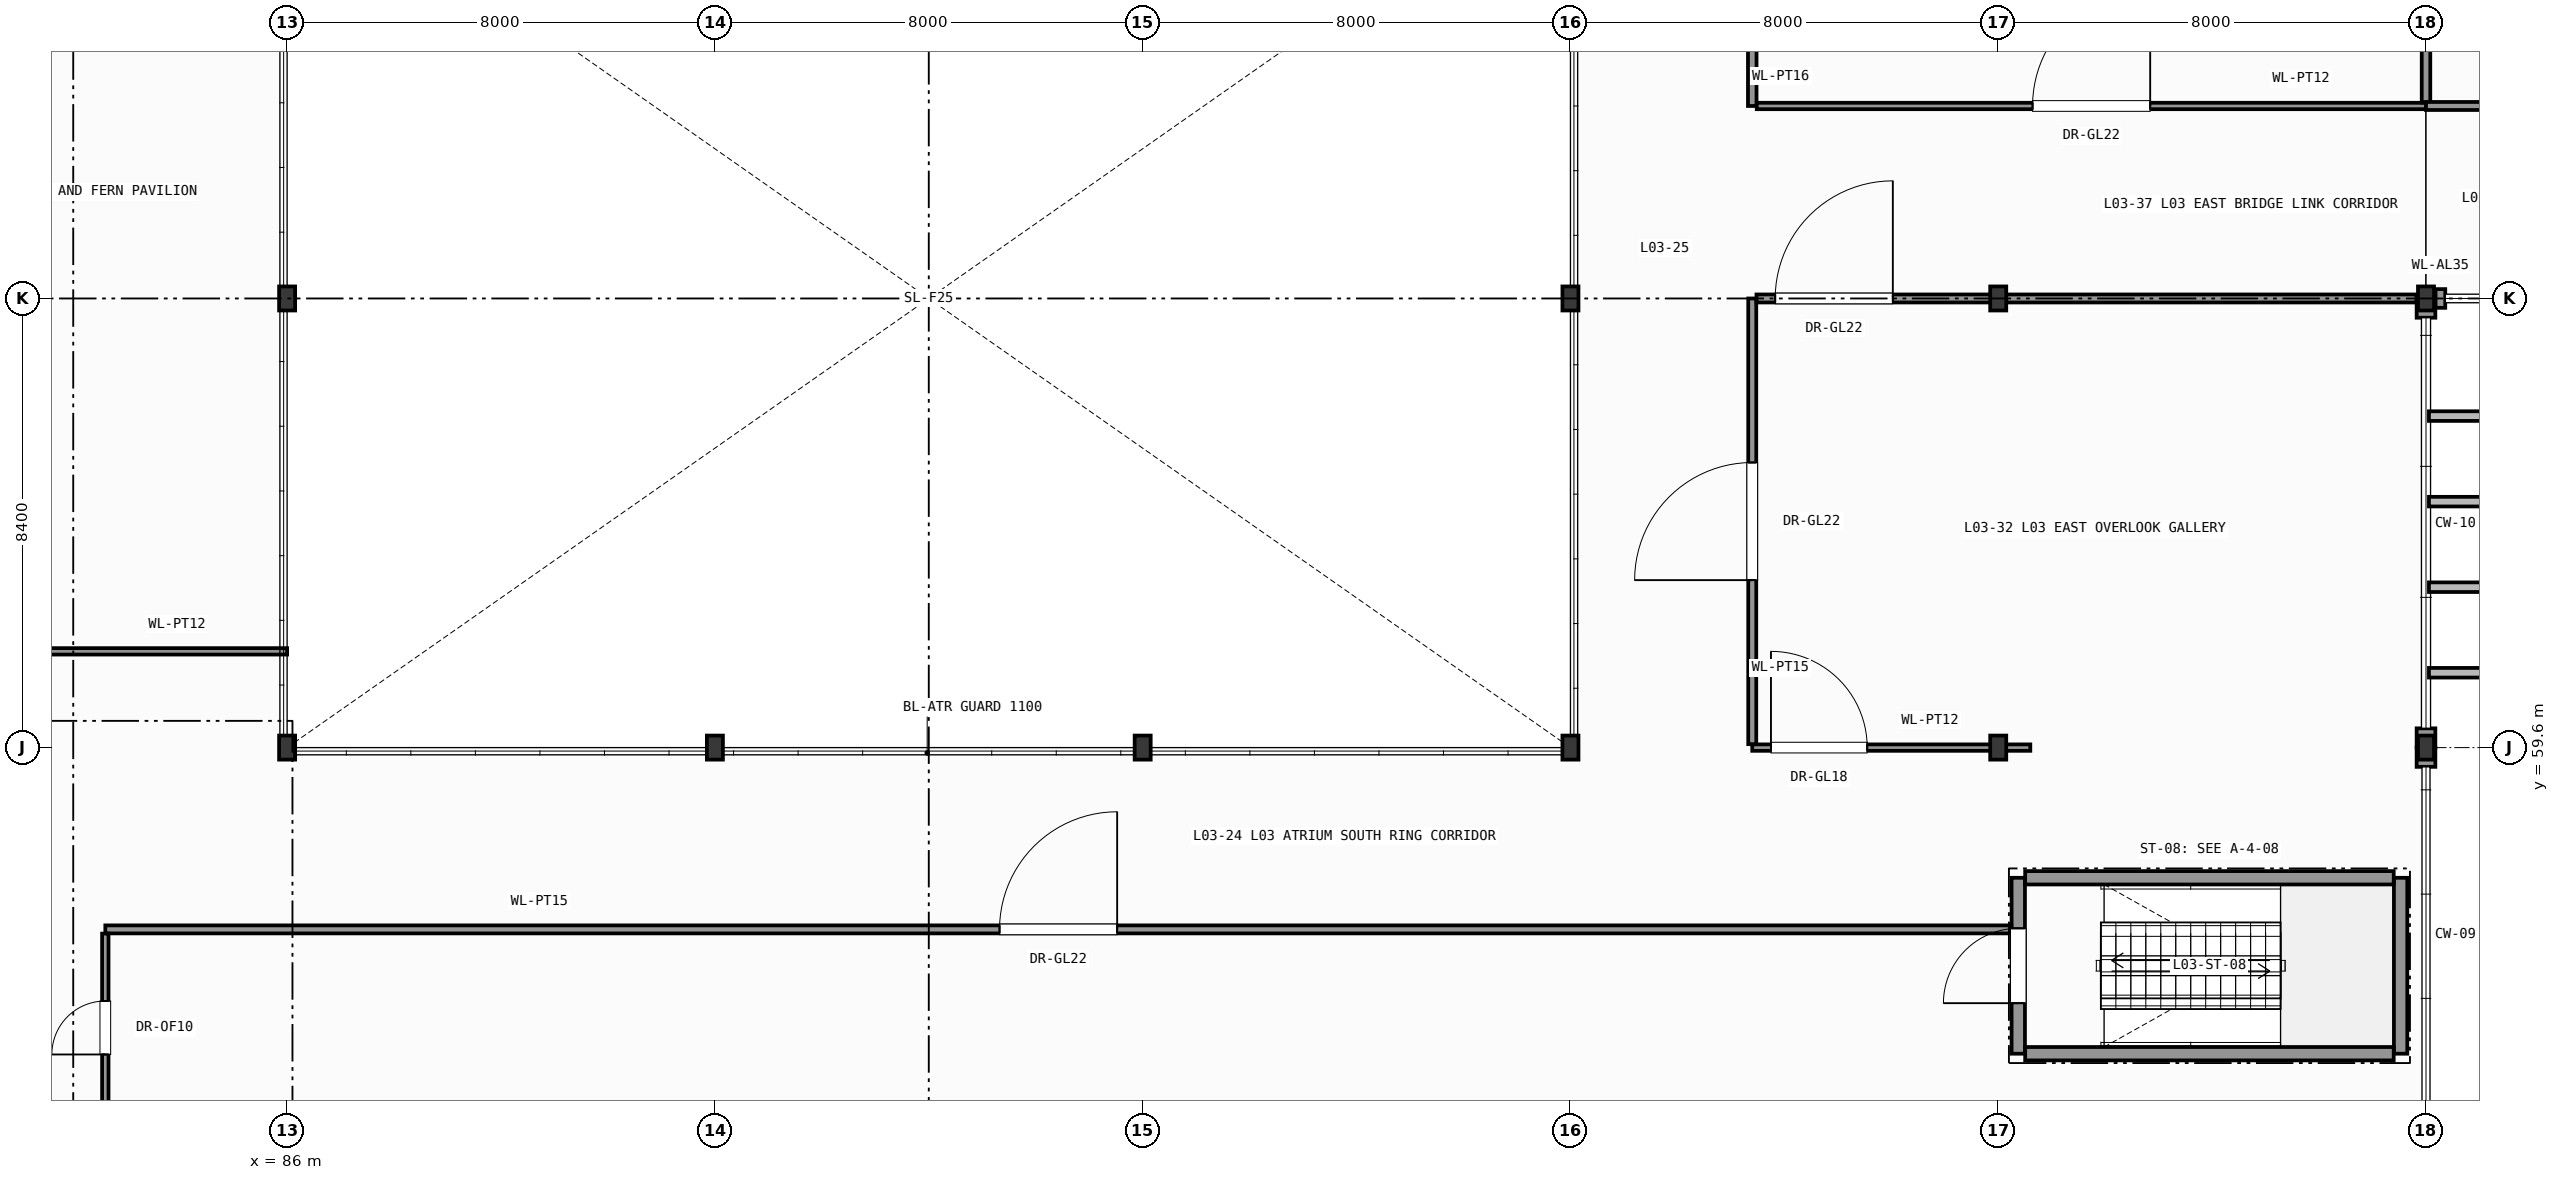
"""IFC4 building model, lengths in metres.
Left out: names, types, materials, properties, quantities, classifications, styles, units other than length and angle.
Written with IfcOpenShell. Run it as: python <this file> out.ifc"""

import sys

from ifc_helpers import new_model, si_unit, direction, frame, frame_2d, origin, origin_2d, place, context, subcontext, project, spatial, rectangle, i_section, extrude, element, fill, save


model = new_model("IFC4")
c1 = context("Model", 3, precision=1e-05, world=origin(), true_north=direction((0.0, 1.0)))
c2 = subcontext(c1, "Body", "Model", "MODEL_VIEW")
j1 = project(units=[si_unit("LENGTHUNIT", "METRE"), si_unit("PLANEANGLEUNIT", "RADIAN")], contexts=[c1])
p1 = place(None, origin())
s1 = spatial("IfcSite", under=j1, at=p1, CompositionType="ELEMENT")
p2 = place(p1, origin())
s2 = spatial("IfcBuilding", under=s1, at=p2, CompositionType="ELEMENT")
p3 = place(p2, frame((0.0, 0.0, 13.2)))
s3 = spatial("IfcBuildingStorey", under=s2, at=p3, CompositionType="ELEMENT", Elevation=13.2)
for number, where, z_axis, x_axis in (
    (1, (86.0, 59.6, 0.0), (0.0, 0.0, 1.0), (1.0, 0.0, 0.0)),
    (2, (86.0, 68.0, 0.0), (0.0, 0.0, 1.0), (1.0, 0.0, 0.0)),
    (3, (94.0, 59.6, 0.0), (0.0, 0.0, 1.0), (1.0, 0.0, 0.0)),
    (4, (102.0, 59.6, 0.0), (0.0, 0.0, 1.0), (1.0, 0.0, 0.0)),
    (5, (110.0, 59.6, 0.0), (0.0, 0.0, 1.0), (1.0, 0.0, 0.0)),
    (6, (110.0, 68.0, 0.0), (0.0, 0.0, 1.0), (1.0, 0.0, 0.0)),
    (7, (118.0, 59.6, 0.0), (0.0, 0.0, 1.0), (1.0, 0.0, 0.0)),
    (8, (118.0, 68.0, 0.0), (0.0, 0.0, 1.0), (1.0, 0.0, 0.0)),
    (9, (126.0, 59.6, 0.0), (0.0, 0.0, 1.0), (1.0, 0.0, 0.0)),
    (10, (126.0, 68.0, 0.0), (0.0, 0.0, 1.0), (1.0, 0.0, 0.0)),
):
    element("IfcColumn", number, at=place(p3, frame(where, z_axis=z_axis, x_axis=x_axis)), inside=s3, PredefinedType="COLUMN", context=c2, shape_type="SweptSolid", body=[
        extrude(i_section(OverallWidth=0.3, OverallDepth=0.45, WebThickness=0.014, FlangeThickness=0.026, FilletRadius=0.027, at=origin_2d()), origin(), (0.0, 0.0, 1.0), 4.8),
    ])
p4 = place(p3, frame((126.0, 59.24, 0.0), z_axis=(0.0, 0.0, 1.0), x_axis=(0.0, 1.0, 0.0)))
e11 = element("IfcWall", 11, at=p4, inside=s3, PredefinedType="SOLIDWALL", context=c2, shape_type="SweptSolid", body=[
    extrude(rectangle(XDim=0.36, YDim=0.35, at=frame_2d((0.18, 0.0))), origin(), (0.0, 0.0, 1.0), 4.255),
])
p5 = place(p3, frame((126.0, 59.6, 0.0), z_axis=(0.0, 0.0, 1.0), x_axis=(0.0, 1.0, 0.0)))
e12 = element("IfcWall", 12, at=p5, inside=s3, PredefinedType="SOLIDWALL", context=c2, shape_type="SweptSolid", body=[
    extrude(rectangle(XDim=0.36, YDim=0.35, at=frame_2d((0.18, 0.0))), origin(), (0.0, 0.0, 1.0), 4.105),
])
p6 = place(p3, frame((126.0, 67.64, 0.0), z_axis=(0.0, 0.0, 1.0), x_axis=(0.0, 1.0, 0.0)))
e13 = element("IfcWall", 13, at=p6, inside=s3, PredefinedType="SOLIDWALL", context=c2, shape_type="SweptSolid", body=[
    extrude(rectangle(XDim=0.36, YDim=0.35, at=frame_2d((0.18, 0.0))), origin(), (0.0, 0.0, 1.0), 4.105),
])
p7 = place(p3, frame((126.179, 68.0, 0.0), z_axis=(0.0, 0.0, 1.0), x_axis=(1.0, 0.0, 0.0)))
e14 = element("IfcWall", 14, at=p7, inside=s3, PredefinedType="SOLIDWALL", context=c2, shape_type="SweptSolid", body=[
    extrude(rectangle(XDim=0.181, YDim=0.35, at=frame_2d((0.091, 0.0))), origin(), (0.0, 0.0, 1.0), 4.56),
])
p8 = place(p3, frame((118.375, 53.875, 0.0), z_axis=(0.0, 0.0, 1.0), x_axis=(0.0, 1.0, 0.0)))
e15 = element("IfcWall", 15, at=p8, inside=s3, PredefinedType="SHEAR", context=c2, shape_type="SweptSolid", body=[
    extrude(rectangle(XDim=3.29, YDim=0.25, at=frame_2d((1.645, 0.0))), origin(), (0.0, 0.0, 1.0), 4.56),
])
p9 = place(p8, frame((0.945, 0.0, 0.0)))
e16 = element("IfcOpeningElement", 16, at=p9, cuts=e15, PredefinedType="OPENING", context=c2, shape_type="SweptSolid", body=[
    extrude(rectangle(XDim=1.4, YDim=2.2, at=frame_2d((0.7, 1.1))), frame((0.0, 0.135, 0.0), z_axis=(0.0, -1.0, 0.0), x_axis=(1.0, 0.0, 0.0)), (0.0, 0.0, 1.0), 0.27),
])
p10 = place(p3, frame((125.525, 53.875, 0.0), z_axis=(0.0, 0.0, 1.0), x_axis=(0.0, 1.0, 0.0)))
e17 = element("IfcWall", 17, at=p10, inside=s3, PredefinedType="SHEAR", context=c2, shape_type="SweptSolid", body=[
    extrude(rectangle(XDim=3.29, YDim=0.25, at=frame_2d((1.645, 0.0))), origin(), (0.0, 0.0, 1.0), 4.56),
])
for number, where, z_axis, x_axis in (
    (18, (118.504, 53.875, 0.0), (0.0, 0.0, 1.0), (1.0, 0.0, 0.0)),
    (19, (118.504, 57.165, 0.0), (0.0, 0.0, 1.0), (1.0, 0.0, 0.0)),
):
    element("IfcWall", number, at=place(p3, frame(where, z_axis=z_axis, x_axis=x_axis)), inside=s3, PredefinedType="SHEAR", context=c2, shape_type="SweptSolid", body=[
        extrude(rectangle(XDim=6.892, YDim=0.25, at=frame_2d((3.446, 0.0))), origin(), (0.0, 0.0, 1.0), 4.56),
    ])
p11 = place(p3, frame((74.6, 61.4, 0.0), z_axis=(0.0, 0.0, 1.0), x_axis=(1.0, 0.0, 0.0)))
e20 = element("IfcWall", 20, at=p11, inside=s3, PredefinedType="PARTITIONING", context=c2, shape_type="SweptSolid", body=[
    extrude(rectangle(XDim=11.4, YDim=0.12, at=frame_2d((5.7, 0.0))), origin(), (0.0, 0.0, 1.0), 4.56),
])
p12 = place(p11, frame((4.6, 0.0, 0.0)))
e21 = element("IfcOpeningElement", 21, at=p12, cuts=e20, PredefinedType="OPENING", context=c2, shape_type="SweptSolid", body=[
    extrude(rectangle(XDim=2.2, YDim=2.6, at=frame_2d((1.1, 1.3))), frame((0.0, 0.07, 0.0), z_axis=(0.0, -1.0, 0.0), x_axis=(1.0, 0.0, 0.0)), (0.0, 0.0, 1.0), 0.14),
])
p13 = place(p3, frame((82.6, 56.2, 0.0), z_axis=(0.0, 0.0, 1.0), x_axis=(1.0, 0.0, 0.0)))
e22 = element("IfcWall", 22, at=p13, inside=s3, PredefinedType="PARTITIONING", context=c2, shape_type="SweptSolid", body=[
    extrude(rectangle(XDim=35.646, YDim=0.15, at=frame_2d((17.823, 0.0))), origin(), (0.0, 0.0, 1.0), 4.185),
])
p14 = place(p13, frame((16.723, 0.0, 0.0)))
e23 = element("IfcOpeningElement", 23, at=p14, cuts=e22, PredefinedType="OPENING", context=c2, shape_type="SweptSolid", body=[
    extrude(rectangle(XDim=2.2, YDim=2.6, at=frame_2d((1.1, 1.3))), frame((0.0, 0.085, 0.0), z_axis=(0.0, -1.0, 0.0), x_axis=(1.0, 0.0, 0.0)), (0.0, 0.0, 1.0), 0.17),
])
p15 = place(p3, frame((113.4, 59.6, 0.0), z_axis=(0.0, 0.0, 1.0), x_axis=(1.0, 0.0, 0.0)))
e24 = element("IfcWall", 24, at=p15, inside=s3, PredefinedType="PARTITIONING", context=c2, shape_type="SweptSolid", body=[
    extrude(rectangle(XDim=5.2, YDim=0.12, at=frame_2d((2.6, 0.0))), origin(), (0.0, 0.0, 1.0), 4.155),
])
p16 = place(p15, frame((0.35, 0.0, 0.0)))
e25 = element("IfcOpeningElement", 25, at=p16, cuts=e24, PredefinedType="OPENING", context=c2, shape_type="SweptSolid", body=[
    extrude(rectangle(XDim=1.8, YDim=2.4, at=frame_2d((0.9, 1.2))), frame((0.0, 0.07, 0.0), z_axis=(0.0, -1.0, 0.0), x_axis=(1.0, 0.0, 0.0)), (0.0, 0.0, 1.0), 0.14),
])
p17 = place(p3, frame((113.4, 71.6, 0.0), z_axis=(0.0, 0.0, 1.0), x_axis=(0.0, 1.0, 0.0)))
e26 = element("IfcWall", 26, at=p17, inside=s3, PredefinedType="PARTITIONING", context=c2, shape_type="SweptSolid", body=[
    extrude(rectangle(XDim=4.8, YDim=0.16, at=frame_2d((2.4, 0.0))), origin(), (0.0, 0.0, 1.0), 4.56),
])
p18 = place(p17, frame((1.5, 0.0, 0.0)))
e27 = element("IfcOpeningElement", 27, at=p18, cuts=e26, PredefinedType="OPENING", context=c2, shape_type="SweptSolid", body=[
    extrude(rectangle(XDim=1.8, YDim=2.4, at=frame_2d((0.9, 1.2))), frame((0.0, 0.09, 0.0), z_axis=(0.0, -1.0, 0.0), x_axis=(1.0, 0.0, 0.0)), (0.0, 0.0, 1.0), 0.18),
])
p19 = place(p3, frame((113.4, 59.664, 0.0), z_axis=(0.0, 0.0, 1.0), x_axis=(0.0, 1.0, 0.0)))
e28 = element("IfcWall", 28, at=p19, inside=s3, PredefinedType="PARTITIONING", context=c2, shape_type="SweptSolid", body=[
    extrude(rectangle(XDim=8.336, YDim=0.15, at=frame_2d((4.168, 0.0))), origin(), (0.0, 0.0, 1.0), 4.56),
])
p20 = place(p19, frame((3.068, 0.0, 0.0)))
e29 = element("IfcOpeningElement", 29, at=p20, cuts=e28, PredefinedType="OPENING", context=c2, shape_type="SweptSolid", body=[
    extrude(rectangle(XDim=2.2, YDim=2.6, at=frame_2d((1.1, 1.3))), frame((0.0, 0.085, 0.0), z_axis=(0.0, -1.0, 0.0), x_axis=(1.0, 0.0, 0.0)), (0.0, 0.0, 1.0), 0.17),
])
p21 = place(p3, frame((82.6, 52.6, 0.0), z_axis=(0.0, 0.0, 1.0), x_axis=(0.0, 1.0, 0.0)))
e30 = element("IfcWall", 30, at=p21, inside=s3, PredefinedType="PARTITIONING", context=c2, shape_type="SweptSolid", body=[
    extrude(rectangle(XDim=3.521, YDim=0.12, at=frame_2d((1.76, 0.0))), origin(), (0.0, 0.0, 1.0), 4.56),
])
p22 = place(p21, frame((1.26, 0.0, 0.0)))
e31 = element("IfcOpeningElement", 31, at=p22, cuts=e30, PredefinedType="OPENING", context=c2, shape_type="SweptSolid", body=[
    extrude(rectangle(XDim=1.0, YDim=2.15, at=frame_2d((0.5, 1.075))), frame((0.0, 0.07, 0.0), z_axis=(0.0, -1.0, 0.0), x_axis=(1.0, 0.0, 0.0)), (0.0, 0.0, 1.0), 0.14),
])
p23 = place(p3, frame((113.484, 71.6, 0.0), z_axis=(0.0, 0.0, 1.0), x_axis=(1.0, 0.0, 0.0)))
e32 = element("IfcWall", 32, at=p23, inside=s3, PredefinedType="PARTITIONING", context=c2, shape_type="SweptSolid", body=[
    extrude(rectangle(XDim=12.516, YDim=0.12, at=frame_2d((6.258, 0.0))), origin(), (0.0, 0.0, 1.0), 4.56),
])
p24 = place(p23, frame((5.158, 0.0, 0.0)))
e33 = element("IfcOpeningElement", 33, at=p24, cuts=e32, PredefinedType="OPENING", context=c2, shape_type="SweptSolid", body=[
    extrude(rectangle(XDim=2.2, YDim=2.6, at=frame_2d((1.1, 1.3))), frame((0.0, 0.07, 0.0), z_axis=(0.0, -1.0, 0.0), x_axis=(1.0, 0.0, 0.0)), (0.0, 0.0, 1.0), 0.14),
])
p25 = place(p3, frame((126.0, 71.664, 0.0), z_axis=(0.0, 0.0, 1.0), x_axis=(0.0, 1.0, 0.0)))
e34 = element("IfcWall", 34, at=p25, inside=s3, PredefinedType="PARTITIONING", context=c2, shape_type="SweptSolid", body=[
    extrude(rectangle(XDim=4.557, YDim=0.16, at=frame_2d((2.278, 0.0))), origin(), (0.0, 0.0, 1.0), 4.105),
])
p26 = place(p25, frame((1.378, 0.0, 0.0)))
e35 = element("IfcOpeningElement", 35, at=p26, cuts=e34, PredefinedType="OPENING", context=c2, shape_type="SweptSolid", body=[
    extrude(rectangle(XDim=1.8, YDim=2.4, at=frame_2d((0.9, 1.2))), frame((0.0, 0.09, 0.0), z_axis=(0.0, -1.0, 0.0), x_axis=(1.0, 0.0, 0.0)), (0.0, 0.0, 1.0), 0.18),
])
p27 = place(p3, frame((113.479, 68.0, 0.0), z_axis=(0.0, 0.0, 1.0), x_axis=(1.0, 0.0, 0.0)))
e36 = element("IfcWall", 36, at=p27, inside=s3, PredefinedType="PARTITIONING", context=c2, shape_type="SweptSolid", body=[
    extrude(rectangle(XDim=12.342, YDim=0.15, at=frame_2d((6.171, 0.0))), origin(), (0.0, 0.0, 1.0), 4.095),
])
p28 = place(p27, frame((0.35, 0.0, 0.0)))
e37 = element("IfcOpeningElement", 37, at=p28, cuts=e36, PredefinedType="OPENING", context=c2, shape_type="SweptSolid", body=[
    extrude(rectangle(XDim=2.2, YDim=2.6, at=frame_2d((1.1, 1.3))), frame((0.0, 0.085, 0.0), z_axis=(0.0, -1.0, 0.0), x_axis=(1.0, 0.0, 0.0)), (0.0, 0.0, 1.0), 0.17),
])
p29 = place(p3, frame((126.0, 71.6, 0.0), z_axis=(0.0, 0.0, 1.0), x_axis=(1.0, 0.0, 0.0)))
e38 = element("IfcWall", 38, at=p29, inside=s3, PredefinedType="PARTITIONING", context=c2, shape_type="SweptSolid", body=[
    extrude(rectangle(XDim=41.0, YDim=0.15, at=frame_2d((20.5, 0.0))), origin(), (0.0, 0.0, 1.0), 4.56),
])
p30 = place(p29, frame((19.4, 0.0, 0.0)))
e39 = element("IfcOpeningElement", 39, at=p30, cuts=e38, PredefinedType="OPENING", context=c2, shape_type="SweptSolid", body=[
    extrude(rectangle(XDim=2.2, YDim=2.6, at=frame_2d((1.1, 1.3))), frame((0.0, 0.085, 0.0), z_axis=(0.0, -1.0, 0.0), x_axis=(1.0, 0.0, 0.0)), (0.0, 0.0, 1.0), 0.17),
])
p31 = place(p9, origin())
e40 = element("IfcDoor", 40, at=p31, inside=s3, OperationType="SINGLE_SWING_LEFT", PredefinedType="DOOR", context=c2, shape_type="SweptSolid", body=[
    extrude(rectangle(XDim=1.4, YDim=2.2, at=frame_2d((0.7, 1.1))), frame((0.0, 0.025, 0.0), z_axis=(0.0, -1.0, 0.0), x_axis=(1.0, 0.0, 0.0)), (0.0, 0.0, 1.0), 0.05),
])
fill(e16, e40)
p32 = place(p14, origin())
e41 = element("IfcDoor", 41, at=p32, inside=s3, OperationType="SINGLE_SWING_RIGHT", PredefinedType="DOOR", context=c2, shape_type="SweptSolid", body=[
    extrude(rectangle(XDim=2.2, YDim=2.6, at=frame_2d((1.1, 1.3))), frame((0.0, 0.025, 0.0), z_axis=(0.0, -1.0, 0.0), x_axis=(1.0, 0.0, 0.0)), (0.0, 0.0, 1.0), 0.05),
])
fill(e23, e41)
p33 = place(p16, origin())
e42 = element("IfcDoor", 42, at=p33, inside=s3, OperationType="SINGLE_SWING_LEFT", PredefinedType="DOOR", context=c2, shape_type="SweptSolid", body=[
    extrude(rectangle(XDim=1.8, YDim=2.4, at=frame_2d((0.9, 1.2))), frame((0.0, 0.025, 0.0), z_axis=(0.0, -1.0, 0.0), x_axis=(1.0, 0.0, 0.0)), (0.0, 0.0, 1.0), 0.05),
])
fill(e25, e42)
p34 = place(p20, origin())
e43 = element("IfcDoor", 43, at=p34, inside=s3, OperationType="SINGLE_SWING_LEFT", PredefinedType="DOOR", context=c2, shape_type="SweptSolid", body=[
    extrude(rectangle(XDim=2.2, YDim=2.6, at=frame_2d((1.1, 1.3))), frame((0.0, 0.025, 0.0), z_axis=(0.0, -1.0, 0.0), x_axis=(1.0, 0.0, 0.0)), (0.0, 0.0, 1.0), 0.05),
])
fill(e29, e43)
p35 = place(p22, origin())
e44 = element("IfcDoor", 44, at=p35, inside=s3, OperationType="SINGLE_SWING_LEFT", PredefinedType="DOOR", context=c2, shape_type="SweptSolid", body=[
    extrude(rectangle(XDim=1.0, YDim=2.15, at=frame_2d((0.5, 1.075))), frame((0.0, 0.025, 0.0), z_axis=(0.0, -1.0, 0.0), x_axis=(1.0, 0.0, 0.0)), (0.0, 0.0, 1.0), 0.05),
])
fill(e31, e44)
p36 = place(p24, origin())
e45 = element("IfcDoor", 45, at=p36, inside=s3, OperationType="SINGLE_SWING_RIGHT", PredefinedType="DOOR", context=c2, shape_type="SweptSolid", body=[
    extrude(rectangle(XDim=2.2, YDim=2.6, at=frame_2d((1.1, 1.3))), frame((0.0, 0.025, 0.0), z_axis=(0.0, -1.0, 0.0), x_axis=(1.0, 0.0, 0.0)), (0.0, 0.0, 1.0), 0.05),
])
fill(e33, e45)
p37 = place(p28, origin())
e46 = element("IfcDoor", 46, at=p37, inside=s3, OperationType="SINGLE_SWING_RIGHT", PredefinedType="DOOR", context=c2, shape_type="SweptSolid", body=[
    extrude(rectangle(XDim=2.2, YDim=2.6, at=frame_2d((1.1, 1.3))), frame((0.0, 0.025, 0.0), z_axis=(0.0, -1.0, 0.0), x_axis=(1.0, 0.0, 0.0)), (0.0, 0.0, 1.0), 0.05),
])
fill(e37, e46)
save(model, sys.argv[1])
